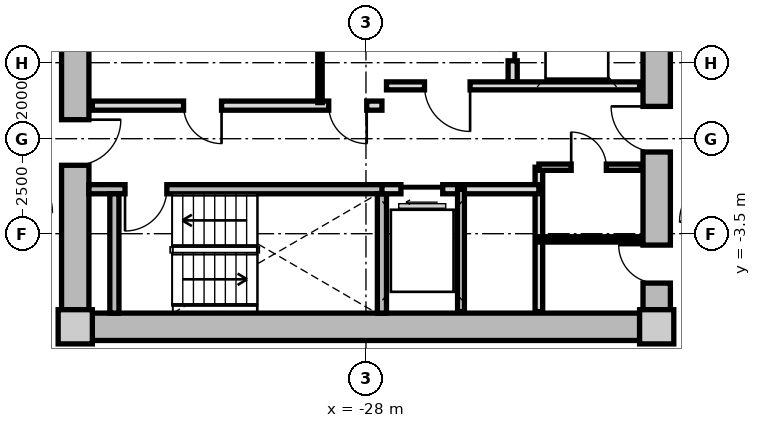
"""IFC4 building model, lengths in metres.
Left out: names, types, materials, properties, quantities, classifications, styles, units other than length and angle.
Written with IfcOpenShell. Run it as: python <this file> out.ifc"""

import sys

from ifc_helpers import new_model, si_unit, direction, frame, frame_2d, origin, origin_2d, place, context, subcontext, project, spatial, rectangle, extrude, source, transform, mapped, element, fill, save


model = new_model("IFC4")
c1 = context("Model", 3, precision=1e-05, world=origin(), true_north=direction((0.0, 1.0)))
c2 = subcontext(c1, "Body", "Model", "MODEL_VIEW")
j1 = project(units=[si_unit("LENGTHUNIT", "METRE"), si_unit("PLANEANGLEUNIT", "RADIAN")], contexts=[c1])
p1 = place(None, origin())
s1 = spatial("IfcSite", under=j1, at=p1, CompositionType="ELEMENT")
p2 = place(p1, origin())
s2 = spatial("IfcBuilding", under=s1, at=p2, CompositionType="ELEMENT")
p3 = place(p2, frame((0.0, 0.0, 96.25)))
s3 = spatial("IfcBuildingStorey", under=s2, at=p3, CompositionType="ELEMENT", Elevation=96.25)
m1 = source(origin(), c2, "Body", "SweptSolid", [
    extrude(rectangle(XDim=0.9, YDim=0.9, at=origin_2d()), origin(), (0.0, 0.0, 1.0), 3.05),
])
for number, where, z_axis, x_axis in (
    (1, (-35.65, -5.95, 0.0), (0.0, 0.0, 1.0), (1.0, 0.0, 0.0)),
    (2, (-20.35, -5.95, 0.0), (0.0, 0.0, 1.0), (1.0, 0.0, 0.0)),
):
    element("IfcColumn", number, at=place(p3, frame(where, z_axis=z_axis, x_axis=x_axis)), inside=s3, PredefinedType="COLUMN", context=c2, shape_type="MappedRepresentation", body=[
        mapped(m1, transform((0.0, 0.0, 0.0), x_axis=(1.0, 0.0, 0.0), y_axis=(0.0, 1.0, 0.0), z_axis=(0.0, 0.0, 1.0), scale=1.0)),
    ])
m2 = source(origin(), c2, "Body", "SweptSolid", [
    extrude(rectangle(XDim=14.4, YDim=0.72, at=frame_2d((7.2, 0.0))), origin(), (0.0, 0.0, 1.0), 2.79),
])
p4 = place(p3, frame((-20.8, -5.95, 0.0), z_axis=(0.0, 0.0, 1.0), x_axis=(-1.0, 0.0, 0.0)))
e3 = element("IfcWall", 3, at=p4, inside=s3, PredefinedType="SHEAR", context=c2, shape_type="MappedRepresentation", body=[
    mapped(m2, transform((0.0, 0.0, 0.0), x_axis=(1.0, 0.0, 0.0), y_axis=(0.0, 1.0, 0.0), z_axis=(0.0, 0.0, 1.0), scale=1.0)),
])
m3 = source(origin(), c2, "Body", "SweptSolid", [
    extrude(rectangle(XDim=11.0, YDim=0.72, at=frame_2d((5.5, 0.0))), origin(), (0.0, 0.0, 1.0), 2.79),
])
p5 = place(p3, frame((-35.65, -5.5, 0.0), z_axis=(0.0, 0.0, 1.0), x_axis=(0.0, 1.0, 0.0)))
e4 = element("IfcWall", 4, at=p5, inside=s3, PredefinedType="SHEAR", context=c2, shape_type="MappedRepresentation", body=[
    mapped(m3, transform((0.0, 0.0, 0.0), x_axis=(1.0, 0.0, 0.0), y_axis=(0.0, 1.0, 0.0), z_axis=(0.0, 0.0, 1.0), scale=1.0)),
])
p6 = place(p5, frame((3.8, 0.0, 0.0)))
e5 = element("IfcOpeningElement", 5, at=p6, cuts=e4, PredefinedType="OPENING", context=c2, shape_type="SweptSolid", body=[
    extrude(rectangle(XDim=1.2, YDim=2.15, at=frame_2d((0.6, 1.075))), frame((0.0, 0.37, 0.0), z_axis=(0.0, -1.0, 0.0), x_axis=(1.0, 0.0, 0.0)), (0.0, 0.0, 1.0), 0.74),
])
p7 = place(p3, frame((-20.35, 5.5, 0.0), z_axis=(0.0, 0.0, 1.0), x_axis=(0.0, -1.0, 0.0)))
e6 = element("IfcWall", 6, at=p7, inside=s3, PredefinedType="SHEAR", context=c2, shape_type="MappedRepresentation", body=[
    mapped(m3, transform((0.0, 0.0, 0.0), x_axis=(1.0, 0.0, 0.0), y_axis=(0.0, 1.0, 0.0), z_axis=(0.0, 0.0, 1.0), scale=1.0)),
])
p8 = place(p7, frame((5.65, 0.0, 0.0)))
e7 = element("IfcOpeningElement", 7, at=p8, cuts=e6, PredefinedType="OPENING", context=c2, shape_type="SweptSolid", body=[
    extrude(rectangle(XDim=1.2, YDim=2.15, at=frame_2d((0.6, 1.075))), frame((0.0, 0.37, 0.0), z_axis=(0.0, -1.0, 0.0), x_axis=(1.0, 0.0, 0.0)), (0.0, 0.0, 1.0), 0.74),
])
p9 = place(p7, frame((9.3, 0.0, 0.0)))
e8 = element("IfcOpeningElement", 8, at=p9, cuts=e6, PredefinedType="OPENING", context=c2, shape_type="SweptSolid", body=[
    extrude(rectangle(XDim=1.0, YDim=2.1, at=frame_2d((0.5, 1.05))), frame((0.0, 0.37, 0.0), z_axis=(0.0, -1.0, 0.0), x_axis=(1.0, 0.0, 0.0)), (0.0, 0.0, 1.0), 0.74),
])
m4 = source(origin(), c2, "Body", "SweptSolid", [
    extrude(rectangle(XDim=7.83, YDim=0.24, at=frame_2d((3.915, 0.0))), origin(), (0.0, 0.0, 1.0), 2.79),
])
p10 = place(p3, frame((-35.29, -2.33, 0.0), z_axis=(0.0, 0.0, 1.0), x_axis=(1.0, 0.0, 0.0)))
e9 = element("IfcWall", 9, at=p10, inside=s3, PredefinedType="PARTITIONING", context=c2, shape_type="MappedRepresentation", body=[
    mapped(m4, transform((0.0, 0.0, 0.0), x_axis=(1.0, 0.0, 0.0), y_axis=(0.0, 1.0, 0.0), z_axis=(0.0, 0.0, 1.0), scale=1.0)),
])
p11 = place(p10, frame((0.95, 0.0, 0.0)))
e10 = element("IfcOpeningElement", 10, at=p11, cuts=e9, PredefinedType="OPENING", context=c2, shape_type="SweptSolid", body=[
    extrude(rectangle(XDim=1.1, YDim=2.15, at=frame_2d((0.55, 1.075))), frame((0.0, 0.13, 0.0), z_axis=(0.0, -1.0, 0.0), x_axis=(1.0, 0.0, 0.0)), (0.0, 0.0, 1.0), 0.26),
])
m5 = source(origin(), c2, "Body", "SweptSolid", [
    extrude(rectangle(XDim=3.14, YDim=0.24, at=frame_2d((1.57, 0.0))), origin(), (0.0, 0.0, 1.0), 2.79),
])
for number, where, z_axis, x_axis in (
    (11, (-34.62, -5.59, 0.0), (0.0, 0.0, 1.0), (0.0, 1.0, 0.0)),
    (12, (-27.58, -5.59, 0.0), (0.0, 0.0, 1.0), (0.0, 1.0, 0.0)),
):
    element("IfcWall", number, at=place(p3, frame(where, z_axis=z_axis, x_axis=x_axis)), inside=s3, PredefinedType="PARTITIONING", context=c2, shape_type="MappedRepresentation", body=[
        mapped(m5, transform((0.0, 0.0, 0.0), x_axis=(1.0, 0.0, 0.0), y_axis=(0.0, 1.0, 0.0), z_axis=(0.0, 0.0, 1.0), scale=1.0)),
    ])
m6 = source(origin(), c2, "Body", "SweptSolid", [
    extrude(rectangle(XDim=5.0, YDim=0.24, at=frame_2d((2.5, 0.0))), origin(), (0.0, 0.0, 1.0), 2.775),
])
p12 = place(p3, frame((-24.14, 0.5, 0.0), z_axis=(0.0, 0.0, 1.0), x_axis=(0.0, 1.0, 0.0)))
e13 = element("IfcWall", 13, at=p12, inside=s3, PredefinedType="PARTITIONING", context=c2, shape_type="MappedRepresentation", body=[
    mapped(m6, transform((0.0, 0.0, 0.0), x_axis=(1.0, 0.0, 0.0), y_axis=(0.0, 1.0, 0.0), z_axis=(0.0, 0.0, 1.0), scale=1.0)),
])
p13 = place(p12, frame((3.05, 0.0, 0.0)))
e14 = element("IfcOpeningElement", 14, at=p13, cuts=e13, PredefinedType="OPENING", context=c2, shape_type="SweptSolid", body=[
    extrude(rectangle(XDim=1.3, YDim=2.2, at=frame_2d((0.65, 1.1))), frame((0.0, 0.13, 0.0), z_axis=(0.0, -1.0, 0.0), x_axis=(1.0, 0.0, 0.0)), (0.0, 0.0, 1.0), 0.26),
])
p14 = place(p12, frame((0.55, 0.0, 0.0)))
e15 = element("IfcOpeningElement", 15, at=p14, cuts=e13, PredefinedType="OPENING", context=c2, shape_type="SweptSolid", body=[
    extrude(rectangle(XDim=1.3, YDim=2.2, at=frame_2d((0.65, 1.1))), frame((0.0, 0.13, 0.0), z_axis=(0.0, -1.0, 0.0), x_axis=(1.0, 0.0, 0.0)), (0.0, 0.0, 1.0), 0.26),
])
m7 = source(origin(), c2, "Body", "SweptSolid", [
    extrude(rectangle(XDim=6.66, YDim=0.21, at=frame_2d((3.33, 0.0))), origin(), (0.0, 0.0, 1.0), 2.775),
])
p15 = place(p3, frame((-27.46, 0.39, 0.0), z_axis=(0.0, 0.0, 1.0), x_axis=(1.0, 0.0, 0.0)))
e16 = element("IfcWall", 16, at=p15, inside=s3, PredefinedType="PARTITIONING", context=c2, shape_type="MappedRepresentation", body=[
    mapped(m7, transform((0.0, 0.0, 0.0), x_axis=(1.0, 0.0, 0.0), y_axis=(0.0, 1.0, 0.0), z_axis=(0.0, 0.0, 1.0), scale=1.0)),
])
p16 = place(p15, frame((1.0, 0.0, 0.0)))
e17 = element("IfcOpeningElement", 17, at=p16, cuts=e16, PredefinedType="OPENING", context=c2, shape_type="SweptSolid", body=[
    extrude(rectangle(XDim=1.2, YDim=2.15, at=frame_2d((0.6, 1.075))), frame((0.0, 0.115, 0.0), z_axis=(0.0, -1.0, 0.0), x_axis=(1.0, 0.0, 0.0)), (0.0, 0.0, 1.0), 0.23),
])
m8 = source(origin(), c2, "Body", "SweptSolid", [
    extrude(rectangle(XDim=7.62, YDim=0.24, at=frame_2d((3.81, 0.0))), origin(), (0.0, 0.0, 1.0), 2.775),
])
p17 = place(p3, frame((-35.2, -0.13, 0.0), z_axis=(0.0, 0.0, 1.0), x_axis=(1.0, 0.0, 0.0)))
e18 = element("IfcWall", 18, at=p17, inside=s3, PredefinedType="PARTITIONING", context=c2, shape_type="MappedRepresentation", body=[
    mapped(m8, transform((0.0, 0.0, 0.0), x_axis=(1.0, 0.0, 0.0), y_axis=(0.0, 1.0, 0.0), z_axis=(0.0, 0.0, 1.0), scale=1.0)),
])
p18 = place(p17, frame((6.22, 0.0, 0.0)))
e19 = element("IfcOpeningElement", 19, at=p18, cuts=e18, PredefinedType="OPENING", context=c2, shape_type="SweptSolid", body=[
    extrude(rectangle(XDim=1.0, YDim=2.1, at=frame_2d((0.5, 1.05))), frame((0.0, 0.13, 0.0), z_axis=(0.0, -1.0, 0.0), x_axis=(1.0, 0.0, 0.0)), (0.0, 0.0, 1.0), 0.26),
])
p19 = place(p17, frame((2.4, 0.0, 0.0)))
e20 = element("IfcOpeningElement", 20, at=p19, cuts=e18, PredefinedType="OPENING", context=c2, shape_type="SweptSolid", body=[
    extrude(rectangle(XDim=1.0, YDim=2.1, at=frame_2d((0.5, 1.05))), frame((0.0, 0.13, 0.0), z_axis=(0.0, -1.0, 0.0), x_axis=(1.0, 0.0, 0.0)), (0.0, 0.0, 1.0), 0.26),
])
m9 = source(origin(), c2, "Body", "SweptSolid", [
    extrude(rectangle(XDim=2.33, YDim=0.115, at=frame_2d((1.165, 0.0))), origin(), (0.0, 0.0, 1.0), 2.775),
])
p20 = place(p3, frame((-29.21, -0.05, 0.0), z_axis=(0.0, 0.0, 1.0), x_axis=(0.0, 1.0, 0.0)))
e21 = element("IfcWall", 21, at=p20, inside=s3, PredefinedType="PARTITIONING", context=c2, shape_type="MappedRepresentation", body=[
    mapped(m9, transform((0.0, 0.0, 0.0), x_axis=(1.0, 0.0, 0.0), y_axis=(0.0, 1.0, 0.0), z_axis=(0.0, 0.0, 1.0), scale=1.0)),
])
m10 = source(origin(), c2, "Body", "SweptSolid", [
    extrude(rectangle(XDim=3.8, YDim=0.2, at=frame_2d((1.9, 0.0))), origin(), (0.0, 0.0, 1.0), 2.775),
])
p21 = place(p3, frame((-23.45, -5.55, 0.0), z_axis=(0.0, 0.0, 1.0), x_axis=(0.0, 1.0, 0.0)))
e22 = element("IfcWall", 22, at=p21, inside=s3, PredefinedType="PARTITIONING", context=c2, shape_type="MappedRepresentation", body=[
    mapped(m10, transform((0.0, 0.0, 0.0), x_axis=(1.0, 0.0, 0.0), y_axis=(0.0, 1.0, 0.0), z_axis=(0.0, 0.0, 1.0), scale=1.0)),
])
m11 = source(origin(), c2, "Body", "SweptSolid", [
    extrude(rectangle(XDim=4.13, YDim=0.24, at=frame_2d((2.065, 0.0))), origin(), (0.0, 0.0, 1.0), 2.775),
])
p22 = place(p3, frame((-27.58, -2.33, 0.0), z_axis=(0.0, 0.0, 1.0), x_axis=(1.0, 0.0, 0.0)))
e23 = element("IfcWall", 23, at=p22, inside=s3, PredefinedType="PARTITIONING", context=c2, shape_type="MappedRepresentation", body=[
    mapped(m11, transform((0.0, 0.0, 0.0), x_axis=(1.0, 0.0, 0.0), y_axis=(0.0, 1.0, 0.0), z_axis=(0.0, 0.0, 1.0), scale=1.0)),
])
p23 = place(p22, frame((0.5, 0.0, 0.0)))
e24 = element("IfcOpeningElement", 24, at=p23, cuts=e23, PredefinedType="OPENING", context=c2, shape_type="SweptSolid", body=[
    extrude(rectangle(XDim=1.1, YDim=2.2, at=frame_2d((0.55, 1.1))), frame((0.0, 0.13, 0.0), z_axis=(0.0, -1.0, 0.0), x_axis=(1.0, 0.0, 0.0)), (0.0, 0.0, 1.0), 0.26),
])
m12 = source(origin(), c2, "Body", "SweptSolid", [
    extrude(rectangle(XDim=3.22, YDim=0.18, at=frame_2d((1.61, 0.0))), origin(), (0.0, 0.0, 1.0), 2.775),
])
p24 = place(p3, frame((-25.5, -5.55, 0.0), z_axis=(0.0, 0.0, 1.0), x_axis=(0.0, 1.0, 0.0)))
e25 = element("IfcWall", 25, at=p24, inside=s3, PredefinedType="PARTITIONING", context=c2, shape_type="MappedRepresentation", body=[
    mapped(m12, transform((0.0, 0.0, 0.0), x_axis=(1.0, 0.0, 0.0), y_axis=(0.0, 1.0, 0.0), z_axis=(0.0, 0.0, 1.0), scale=1.0)),
])
m13 = source(origin(), c2, "Body", "SweptSolid", [
    extrude(rectangle(XDim=2.7, YDim=0.165, at=frame_2d((1.35, 0.0))), origin(), (0.0, 0.0, 1.0), 2.775),
])
p25 = place(p3, frame((-23.45, -1.75, 0.0), z_axis=(0.0, 0.0, 1.0), x_axis=(1.0, 0.0, 0.0)))
e26 = element("IfcWall", 26, at=p25, inside=s3, PredefinedType="PARTITIONING", context=c2, shape_type="MappedRepresentation", body=[
    mapped(m13, transform((0.0, 0.0, 0.0), x_axis=(1.0, 0.0, 0.0), y_axis=(0.0, 1.0, 0.0), z_axis=(0.0, 0.0, 1.0), scale=1.0)),
])
p26 = place(p25, frame((0.85, 0.0, 0.0)))
e27 = element("IfcOpeningElement", 27, at=p26, cuts=e26, PredefinedType="OPENING", context=c2, shape_type="SweptSolid", body=[
    extrude(rectangle(XDim=0.925, YDim=2.1, at=frame_2d((0.462, 1.05))), frame((0.0, 0.093, 0.0), z_axis=(0.0, -1.0, 0.0), x_axis=(1.0, 0.0, 0.0)), (0.0, 0.0, 1.0), 0.185),
])
m14 = source(origin(), c2, "Body", "SweptSolid", [
    extrude(rectangle(XDim=2.7, YDim=0.14, at=frame_2d((1.35, 0.0))), origin(), (0.0, 0.0, 1.0), 2.775),
])
p27 = place(p3, frame((-23.45, -3.65, 0.0), z_axis=(0.0, 0.0, 1.0), x_axis=(1.0, 0.0, 0.0)))
e28 = element("IfcWall", 28, at=p27, inside=s3, PredefinedType="PARTITIONING", context=c2, shape_type="MappedRepresentation", body=[
    mapped(m14, transform((0.0, 0.0, 0.0), x_axis=(1.0, 0.0, 0.0), y_axis=(0.0, 1.0, 0.0), z_axis=(0.0, 0.0, 1.0), scale=1.0)),
])
m15 = source(origin(), c2, "Body", "SweptSolid", [
    extrude(rectangle(XDim=1.1, YDim=2.15, at=frame_2d((0.55, 1.075))), frame((0.0, 0.025, 0.0), z_axis=(0.0, -1.0, 0.0), x_axis=(1.0, 0.0, 0.0)), (0.0, 0.0, 1.0), 0.05),
])
p28 = place(p11, frame((1.1, 0.0, 0.0), z_axis=(0.0, 0.0, 1.0), x_axis=(-1.0, 0.0, 0.0)))
e29 = element("IfcDoor", 29, at=p28, inside=s3, OperationType="SINGLE_SWING_RIGHT", PredefinedType="DOOR", context=c2, shape_type="MappedRepresentation", body=[
    mapped(m15, transform((0.0, 0.0, 0.0), x_axis=(1.0, 0.0, 0.0), y_axis=(0.0, 1.0, 0.0), z_axis=(0.0, 0.0, 1.0), scale=1.0)),
])
fill(e10, e29)
m16 = source(origin(), c2, "Body", "SweptSolid", [
    extrude(rectangle(XDim=1.3, YDim=2.2, at=frame_2d((0.65, 1.1))), frame((0.0, 0.025, 0.0), z_axis=(0.0, -1.0, 0.0), x_axis=(1.0, 0.0, 0.0)), (0.0, 0.0, 1.0), 0.05),
])
p29 = place(p14, origin())
e30 = element("IfcDoor", 30, at=p29, inside=s3, OperationType="SLIDING_TO_RIGHT", PredefinedType="DOOR", context=c2, shape_type="MappedRepresentation", body=[
    mapped(m16, transform((0.0, 0.0, 0.0), x_axis=(1.0, 0.0, 0.0), y_axis=(0.0, 1.0, 0.0), z_axis=(0.0, 0.0, 1.0), scale=1.0)),
])
fill(e15, e30)
m17 = source(origin(), c2, "Body", "SweptSolid", [
    extrude(rectangle(XDim=1.2, YDim=2.15, at=frame_2d((0.6, 1.075))), frame((0.0, 0.025, 0.0), z_axis=(0.0, -1.0, 0.0), x_axis=(1.0, 0.0, 0.0)), (0.0, 0.0, 1.0), 0.05),
])
p30 = place(p16, frame((1.2, 0.0, 0.0), z_axis=(0.0, 0.0, 1.0), x_axis=(-1.0, 0.0, 0.0)))
e31 = element("IfcDoor", 31, at=p30, inside=s3, OperationType="SINGLE_SWING_LEFT", PredefinedType="DOOR", context=c2, shape_type="MappedRepresentation", body=[
    mapped(m17, transform((0.0, 0.0, 0.0), x_axis=(1.0, 0.0, 0.0), y_axis=(0.0, 1.0, 0.0), z_axis=(0.0, 0.0, 1.0), scale=1.0)),
])
fill(e17, e31)
p31 = place(p6, frame((1.2, 0.0, 0.0), z_axis=(0.0, 0.0, 1.0), x_axis=(-1.0, 0.0, 0.0)))
e32 = element("IfcDoor", 32, at=p31, inside=s3, OperationType="SINGLE_SWING_LEFT", PredefinedType="DOOR", context=c2, shape_type="MappedRepresentation", body=[
    mapped(m17, transform((0.0, 0.0, 0.0), x_axis=(1.0, 0.0, 0.0), y_axis=(0.0, 1.0, 0.0), z_axis=(0.0, 0.0, 1.0), scale=1.0)),
])
fill(e5, e32)
p32 = place(p8, frame((1.2, 0.0, 0.0), z_axis=(0.0, 0.0, 1.0), x_axis=(-1.0, 0.0, 0.0)))
e33 = element("IfcDoor", 33, at=p32, inside=s3, OperationType="SINGLE_SWING_RIGHT", PredefinedType="DOOR", context=c2, shape_type="MappedRepresentation", body=[
    mapped(m17, transform((0.0, 0.0, 0.0), x_axis=(1.0, 0.0, 0.0), y_axis=(0.0, 1.0, 0.0), z_axis=(0.0, 0.0, 1.0), scale=1.0)),
])
fill(e7, e33)
m18 = source(origin(), c2, "Body", "SweptSolid", [
    extrude(rectangle(XDim=1.0, YDim=2.1, at=frame_2d((0.5, 1.05))), frame((0.0, 0.025, 0.0), z_axis=(0.0, -1.0, 0.0), x_axis=(1.0, 0.0, 0.0)), (0.0, 0.0, 1.0), 0.05),
])
p33 = place(p18, frame((1.0, 0.0, 0.0), z_axis=(0.0, 0.0, 1.0), x_axis=(-1.0, 0.0, 0.0)))
e34 = element("IfcDoor", 34, at=p33, inside=s3, OperationType="SINGLE_SWING_LEFT", PredefinedType="DOOR", context=c2, shape_type="MappedRepresentation", body=[
    mapped(m18, transform((0.0, 0.0, 0.0), x_axis=(1.0, 0.0, 0.0), y_axis=(0.0, 1.0, 0.0), z_axis=(0.0, 0.0, 1.0), scale=1.0)),
])
fill(e19, e34)
p34 = place(p19, frame((1.0, 0.0, 0.0), z_axis=(0.0, 0.0, 1.0), x_axis=(-1.0, 0.0, 0.0)))
e35 = element("IfcDoor", 35, at=p34, inside=s3, OperationType="SINGLE_SWING_LEFT", PredefinedType="DOOR", context=c2, shape_type="MappedRepresentation", body=[
    mapped(m18, transform((0.0, 0.0, 0.0), x_axis=(1.0, 0.0, 0.0), y_axis=(0.0, 1.0, 0.0), z_axis=(0.0, 0.0, 1.0), scale=1.0)),
])
fill(e20, e35)
m19 = source(origin(), c2, "Body", "SweptSolid", [
    extrude(rectangle(XDim=1.1, YDim=2.2, at=frame_2d((0.55, 1.1))), frame((0.0, 0.025, 0.0), z_axis=(0.0, -1.0, 0.0), x_axis=(1.0, 0.0, 0.0)), (0.0, 0.0, 1.0), 0.05),
])
p35 = place(p23, frame((1.1, 0.0, 0.0), z_axis=(0.0, 0.0, 1.0), x_axis=(-1.0, 0.0, 0.0)))
e36 = element("IfcDoor", 36, at=p35, inside=s3, OperationType="SLIDING_TO_LEFT", PredefinedType="DOOR", context=c2, shape_type="MappedRepresentation", body=[
    mapped(m19, transform((0.0, 0.0, 0.0), x_axis=(1.0, 0.0, 0.0), y_axis=(0.0, 1.0, 0.0), z_axis=(0.0, 0.0, 1.0), scale=1.0)),
])
fill(e24, e36)
m20 = source(origin(), c2, "Body", "SweptSolid", [
    extrude(rectangle(XDim=0.925, YDim=2.1, at=frame_2d((0.462, 1.05))), frame((0.0, 0.025, 0.0), z_axis=(0.0, -1.0, 0.0), x_axis=(1.0, 0.0, 0.0)), (0.0, 0.0, 1.0), 0.05),
])
p36 = place(p26, origin())
e37 = element("IfcDoor", 37, at=p36, inside=s3, OperationType="SINGLE_SWING_LEFT", PredefinedType="DOOR", context=c2, shape_type="MappedRepresentation", body=[
    mapped(m20, transform((0.0, 0.0, 0.0), x_axis=(1.0, 0.0, 0.0), y_axis=(0.0, 1.0, 0.0), z_axis=(0.0, 0.0, 1.0), scale=1.0)),
])
fill(e27, e37)
p37 = place(p9, frame((1.0, 0.0, 0.0), z_axis=(0.0, 0.0, 1.0), x_axis=(-1.0, 0.0, 0.0)))
e38 = element("IfcDoor", 38, at=p37, inside=s3, OperationType="SINGLE_SWING_RIGHT", PredefinedType="DOOR", context=c2, shape_type="MappedRepresentation", body=[
    mapped(m18, transform((0.0, 0.0, 0.0), x_axis=(1.0, 0.0, 0.0), y_axis=(0.0, 1.0, 0.0), z_axis=(0.0, 0.0, 1.0), scale=1.0)),
])
fill(e8, e38)
save(model, sys.argv[1])
